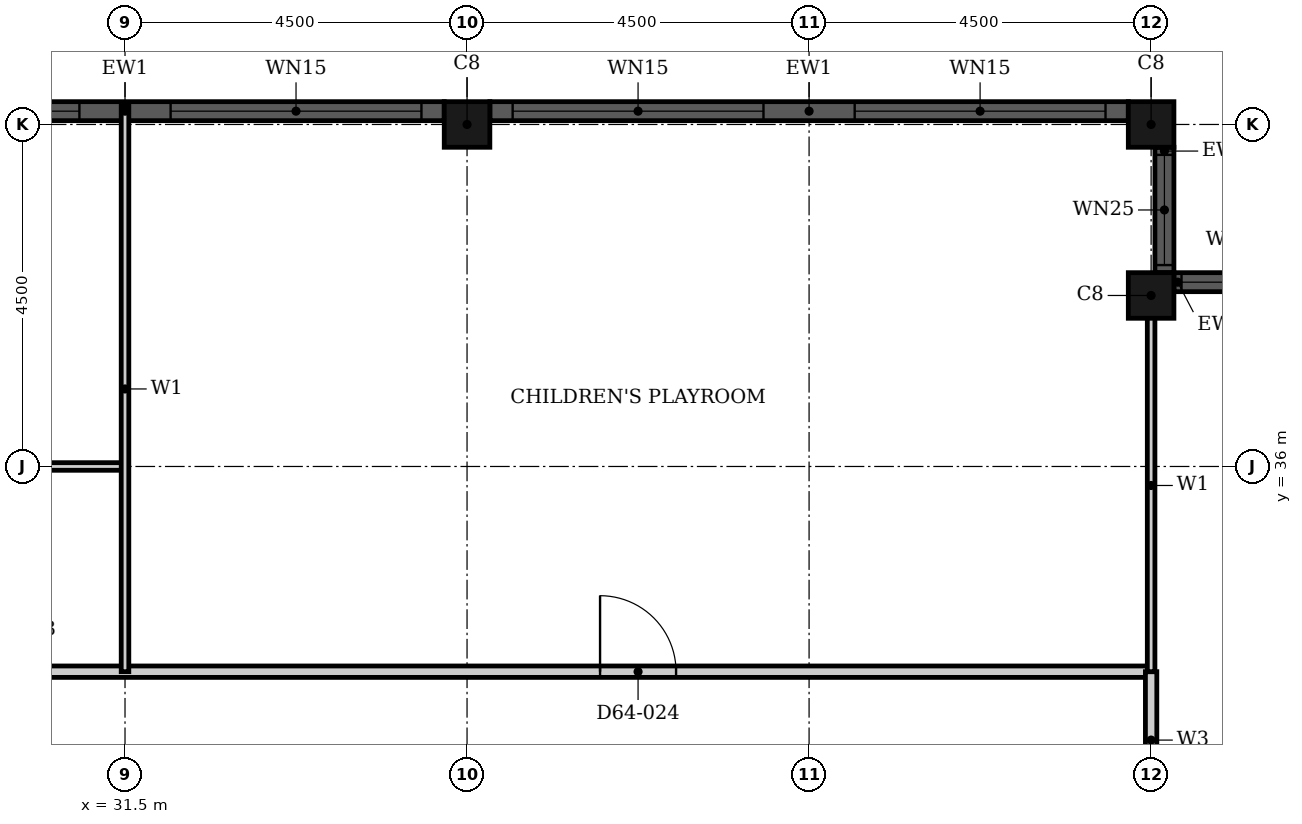
"""IFC4 building model, lengths in metres.
Left out: names, types, materials, properties, quantities, classifications, styles, units other than length and angle.
Written with IfcOpenShell. Run it as: python <this file> out.ifc"""

import sys

from ifc_helpers import new_model, si_unit, direction, frame, frame_2d, origin, origin_2d, place, context, subcontext, project, spatial, rectangle, hollow_rectangle, extrude, element, fill, save


model = new_model("IFC4")
c1 = context("Model", 3, precision=1e-05, world=origin(), true_north=direction((0.0, 1.0)))
c2 = subcontext(c1, "Body", "Model", "MODEL_VIEW")
j1 = project(units=[si_unit("LENGTHUNIT", "METRE"), si_unit("PLANEANGLEUNIT", "RADIAN")], contexts=[c1])
p1 = place(None, origin())
s1 = spatial("IfcSite", under=j1, at=p1, CompositionType="ELEMENT")
p2 = place(p1, origin())
s2 = spatial("IfcBuilding", under=s1, at=p2, CompositionType="ELEMENT")
p3 = place(p2, frame((0.0, 0.0, 252.7)))
s3 = spatial("IfcBuildingStorey", under=s2, at=p3, CompositionType="ELEMENT", Elevation=252.7)
for number, where, z_axis, x_axis in (
    (1, (45.0, 38.25, 0.0), (0.0, 0.0, 1.0), (1.0, 0.0, 0.0)),
    (2, (45.0, 40.5, 0.0), (0.0, 0.0, 1.0), (1.0, 0.0, 0.0)),
    (3, (36.0, 40.5, 0.0), (0.0, 0.0, 1.0), (1.0, 0.0, 0.0)),
):
    element("IfcColumn", number, at=place(p3, frame(where, z_axis=z_axis, x_axis=x_axis)), inside=s3, PredefinedType="COLUMN", context=c2, shape_type="SweptSolid", body=[
        extrude(hollow_rectangle(XDim=0.6, YDim=0.6, WallThickness=0.02, at=origin_2d()), origin(), (0.0, 0.0, 1.0), 3.7),
    ])
p4 = place(p3, frame((46.95, 38.425, 0.0), z_axis=(0.0, 0.0, 1.0), x_axis=(-1.0, 0.0, 0.0)))
e4 = element("IfcWall", 4, at=p4, inside=s3, PredefinedType="SOLIDWALL", context=c2, shape_type="SweptSolid", body=[
    extrude(rectangle(XDim=1.65, YDim=0.25, at=frame_2d((0.825, 0.0))), origin(), (0.0, 0.0, 1.0), 3.7),
])
p5 = place(p4, frame((0.1, 0.0, 0.9)))
e5 = element("IfcOpeningElement", 5, at=p5, cuts=e4, PredefinedType="OPENING", context=c2, shape_type="SweptSolid", body=[
    extrude(rectangle(XDim=1.45, YDim=1.85, at=frame_2d((0.725, 0.925))), frame((0.0, 0.135, 0.0), z_axis=(0.0, -1.0, 0.0), x_axis=(1.0, 0.0, 0.0)), (0.0, 0.0, 1.0), 0.27),
])
p6 = place(p3, frame((45.175, 38.55, 0.0), z_axis=(0.0, 0.0, 1.0), x_axis=(0.0, 1.0, 0.0)))
e6 = element("IfcWall", 6, at=p6, inside=s3, PredefinedType="SOLIDWALL", context=c2, shape_type="SweptSolid", body=[
    extrude(rectangle(XDim=1.65, YDim=0.25, at=frame_2d((0.825, 0.0))), origin(), (0.0, 0.0, 1.0), 3.7),
])
p7 = place(p6, frame((0.1, 0.0, 0.9)))
e7 = element("IfcOpeningElement", 7, at=p7, cuts=e6, PredefinedType="OPENING", context=c2, shape_type="SweptSolid", body=[
    extrude(rectangle(XDim=1.45, YDim=1.85, at=frame_2d((0.725, 0.925))), frame((0.0, 0.135, 0.0), z_axis=(0.0, -1.0, 0.0), x_axis=(1.0, 0.0, 0.0)), (0.0, 0.0, 1.0), 0.27),
])
p8 = place(p3, frame((44.7, 40.675, 0.0), z_axis=(0.0, 0.0, 1.0), x_axis=(-1.0, 0.0, 0.0)))
e8 = element("IfcWall", 8, at=p8, inside=s3, PredefinedType="SOLIDWALL", context=c2, shape_type="SweptSolid", body=[
    extrude(rectangle(XDim=8.4, YDim=0.25, at=frame_2d((4.2, 0.0))), origin(), (0.0, 0.0, 1.0), 3.7),
])
p9 = place(p8, frame((0.3, 0.0, 0.45)))
e9 = element("IfcOpeningElement", 9, at=p9, cuts=e8, PredefinedType="OPENING", context=c2, shape_type="SweptSolid", body=[
    extrude(rectangle(XDim=3.3, YDim=2.3, at=frame_2d((1.65, 1.15))), frame((0.0, 0.135, 0.0), z_axis=(0.0, -1.0, 0.0), x_axis=(1.0, 0.0, 0.0)), (0.0, 0.0, 1.0), 0.27),
])
p10 = place(p8, frame((4.8, 0.0, 0.45)))
e10 = element("IfcOpeningElement", 10, at=p10, cuts=e8, PredefinedType="OPENING", context=c2, shape_type="SweptSolid", body=[
    extrude(rectangle(XDim=3.3, YDim=2.3, at=frame_2d((1.65, 1.15))), frame((0.0, 0.135, 0.0), z_axis=(0.0, -1.0, 0.0), x_axis=(1.0, 0.0, 0.0)), (0.0, 0.0, 1.0), 0.27),
])
p11 = place(p3, frame((35.7, 40.675, 0.0), z_axis=(0.0, 0.0, 1.0), x_axis=(-1.0, 0.0, 0.0)))
e11 = element("IfcWall", 11, at=p11, inside=s3, PredefinedType="SOLIDWALL", context=c2, shape_type="SweptSolid", body=[
    extrude(rectangle(XDim=8.4, YDim=0.25, at=frame_2d((4.2, 0.0))), origin(), (0.0, 0.0, 1.0), 3.7),
])
p12 = place(p11, frame((0.3, 0.0, 0.45)))
e12 = element("IfcOpeningElement", 12, at=p12, cuts=e11, PredefinedType="OPENING", context=c2, shape_type="SweptSolid", body=[
    extrude(rectangle(XDim=3.3, YDim=2.3, at=frame_2d((1.65, 1.15))), frame((0.0, 0.135, 0.0), z_axis=(0.0, -1.0, 0.0), x_axis=(1.0, 0.0, 0.0)), (0.0, 0.0, 1.0), 0.27),
])
p13 = place(p11, frame((4.8, 0.0, 0.45)))
e13 = element("IfcOpeningElement", 13, at=p13, cuts=e11, PredefinedType="OPENING", context=c2, shape_type="SweptSolid", body=[
    extrude(rectangle(XDim=3.3, YDim=2.3, at=frame_2d((1.65, 1.15))), frame((0.0, 0.135, 0.0), z_axis=(0.0, -1.0, 0.0), x_axis=(1.0, 0.0, 0.0)), (0.0, 0.0, 1.0), 0.27),
])
p14 = place(p3, frame((20.4, 33.3, 0.0), z_axis=(0.0, 0.0, 1.0), x_axis=(1.0, 0.0, 0.0)))
e14 = element("IfcWall", 14, at=p14, inside=s3, PredefinedType="PARTITIONING", context=c2, shape_type="SweptSolid", body=[
    extrude(rectangle(XDim=24.6, YDim=0.15, at=frame_2d((12.3, 0.0))), origin(), (0.0, 0.0, 1.0), 3.4),
])
p15 = place(p14, frame((1.6, 0.0, 0.0)))
e15 = element("IfcOpeningElement", 15, at=p15, cuts=e14, PredefinedType="OPENING", context=c2, shape_type="SweptSolid", body=[
    extrude(rectangle(XDim=1.0, YDim=2.2, at=frame_2d((0.5, 1.1))), frame((0.0, 0.085, 0.0), z_axis=(0.0, -1.0, 0.0), x_axis=(1.0, 0.0, 0.0)), (0.0, 0.0, 1.0), 0.17),
])
p16 = place(p14, frame((17.35, 0.0, 0.0)))
e16 = element("IfcOpeningElement", 16, at=p16, cuts=e14, PredefinedType="OPENING", context=c2, shape_type="SweptSolid", body=[
    extrude(rectangle(XDim=1.0, YDim=2.1, at=frame_2d((0.5, 1.05))), frame((0.0, 0.085, 0.0), z_axis=(0.0, -1.0, 0.0), x_axis=(1.0, 0.0, 0.0)), (0.0, 0.0, 1.0), 0.17),
])
p17 = place(p3, frame((45.0, 31.5, 0.0), z_axis=(0.0, 0.0, 1.0), x_axis=(0.0, 1.0, 0.0)))
e17 = element("IfcWall", 17, at=p17, inside=s3, PredefinedType="PARTITIONING", context=c2, shape_type="SweptSolid", body=[
    extrude(rectangle(XDim=1.8, YDim=0.15, at=frame_2d((0.9, 0.0))), origin(), (0.0, 0.0, 1.0), 3.4),
])
p18 = place(p3, frame((24.6, 36.0, 0.0), z_axis=(0.0, 0.0, 1.0), x_axis=(1.0, 0.0, 0.0)))
e18 = element("IfcWall", 18, at=p18, inside=s3, PredefinedType="PARTITIONING", context=c2, shape_type="SweptSolid", body=[
    extrude(rectangle(XDim=6.9, YDim=0.1, at=frame_2d((3.45, 0.0))), origin(), (0.0, 0.0, 1.0), 3.4),
])
p19 = place(p18, frame((4.65, 0.0, 0.0)))
e19 = element("IfcOpeningElement", 19, at=p19, cuts=e18, PredefinedType="OPENING", context=c2, shape_type="SweptSolid", body=[
    extrude(rectangle(XDim=0.9, YDim=2.1, at=frame_2d((0.45, 1.05))), frame((0.0, 0.06, 0.0), z_axis=(0.0, -1.0, 0.0), x_axis=(1.0, 0.0, 0.0)), (0.0, 0.0, 1.0), 0.12),
])
p20 = place(p3, frame((31.5, 33.3, 0.0), z_axis=(0.0, 0.0, 1.0), x_axis=(0.0, 1.0, 0.0)))
e20 = element("IfcWall", 20, at=p20, inside=s3, PredefinedType="PARTITIONING", context=c2, shape_type="SweptSolid", body=[
    extrude(rectangle(XDim=7.44, YDim=0.1, at=frame_2d((3.72, 0.0))), origin(), (0.0, 0.0, 1.0), 3.4),
])
p21 = place(p3, frame((45.0, 33.3, 0.0), z_axis=(0.0, 0.0, 1.0), x_axis=(0.0, 1.0, 0.0)))
e21 = element("IfcWall", 21, at=p21, inside=s3, PredefinedType="PARTITIONING", context=c2, shape_type="SweptSolid", body=[
    extrude(rectangle(XDim=4.9, YDim=0.1, at=frame_2d((2.45, 0.0))), origin(), (0.0, 0.0, 1.0), 3.4),
])
p22 = place(p5, origin())
e22 = element("IfcWindow", 22, at=p22, inside=s3, PartitioningType="SINGLE_PANEL", PredefinedType="WINDOW", context=c2, shape_type="SweptSolid", body=[
    extrude(rectangle(XDim=1.45, YDim=1.85, at=frame_2d((0.725, 0.925))), frame((0.0, 0.03, 0.0), z_axis=(0.0, -1.0, 0.0), x_axis=(1.0, 0.0, 0.0)), (0.0, 0.0, 1.0), 0.06),
])
fill(e5, e22)
p23 = place(p7, origin())
e23 = element("IfcWindow", 23, at=p23, inside=s3, PartitioningType="SINGLE_PANEL", PredefinedType="WINDOW", context=c2, shape_type="SweptSolid", body=[
    extrude(rectangle(XDim=1.45, YDim=1.85, at=frame_2d((0.725, 0.925))), frame((0.0, 0.03, 0.0), z_axis=(0.0, -1.0, 0.0), x_axis=(1.0, 0.0, 0.0)), (0.0, 0.0, 1.0), 0.06),
])
fill(e7, e23)
p24 = place(p9, origin())
e24 = element("IfcWindow", 24, at=p24, inside=s3, PartitioningType="SINGLE_PANEL", PredefinedType="WINDOW", context=c2, shape_type="SweptSolid", body=[
    extrude(rectangle(XDim=3.3, YDim=2.3, at=frame_2d((1.65, 1.15))), frame((0.0, 0.03, 0.0), z_axis=(0.0, -1.0, 0.0), x_axis=(1.0, 0.0, 0.0)), (0.0, 0.0, 1.0), 0.06),
])
fill(e9, e24)
p25 = place(p10, origin())
e25 = element("IfcWindow", 25, at=p25, inside=s3, PartitioningType="SINGLE_PANEL", PredefinedType="WINDOW", context=c2, shape_type="SweptSolid", body=[
    extrude(rectangle(XDim=3.3, YDim=2.3, at=frame_2d((1.65, 1.15))), frame((0.0, 0.03, 0.0), z_axis=(0.0, -1.0, 0.0), x_axis=(1.0, 0.0, 0.0)), (0.0, 0.0, 1.0), 0.06),
])
fill(e10, e25)
p26 = place(p12, origin())
e26 = element("IfcWindow", 26, at=p26, inside=s3, PartitioningType="SINGLE_PANEL", PredefinedType="WINDOW", context=c2, shape_type="SweptSolid", body=[
    extrude(rectangle(XDim=3.3, YDim=2.3, at=frame_2d((1.65, 1.15))), frame((0.0, 0.03, 0.0), z_axis=(0.0, -1.0, 0.0), x_axis=(1.0, 0.0, 0.0)), (0.0, 0.0, 1.0), 0.06),
])
fill(e12, e26)
p27 = place(p13, origin())
e27 = element("IfcWindow", 27, at=p27, inside=s3, PartitioningType="SINGLE_PANEL", PredefinedType="WINDOW", context=c2, shape_type="SweptSolid", body=[
    extrude(rectangle(XDim=3.3, YDim=2.3, at=frame_2d((1.65, 1.15))), frame((0.0, 0.03, 0.0), z_axis=(0.0, -1.0, 0.0), x_axis=(1.0, 0.0, 0.0)), (0.0, 0.0, 1.0), 0.06),
])
fill(e13, e27)
p28 = place(p16, origin())
e28 = element("IfcDoor", 28, at=p28, inside=s3, OperationType="SINGLE_SWING_RIGHT", PredefinedType="DOOR", context=c2, shape_type="SweptSolid", body=[
    extrude(rectangle(XDim=1.0, YDim=2.1, at=frame_2d((0.5, 1.05))), frame((0.0, 0.025, 0.0), z_axis=(0.0, -1.0, 0.0), x_axis=(1.0, 0.0, 0.0)), (0.0, 0.0, 1.0), 0.05),
])
fill(e16, e28)
save(model, sys.argv[1])
